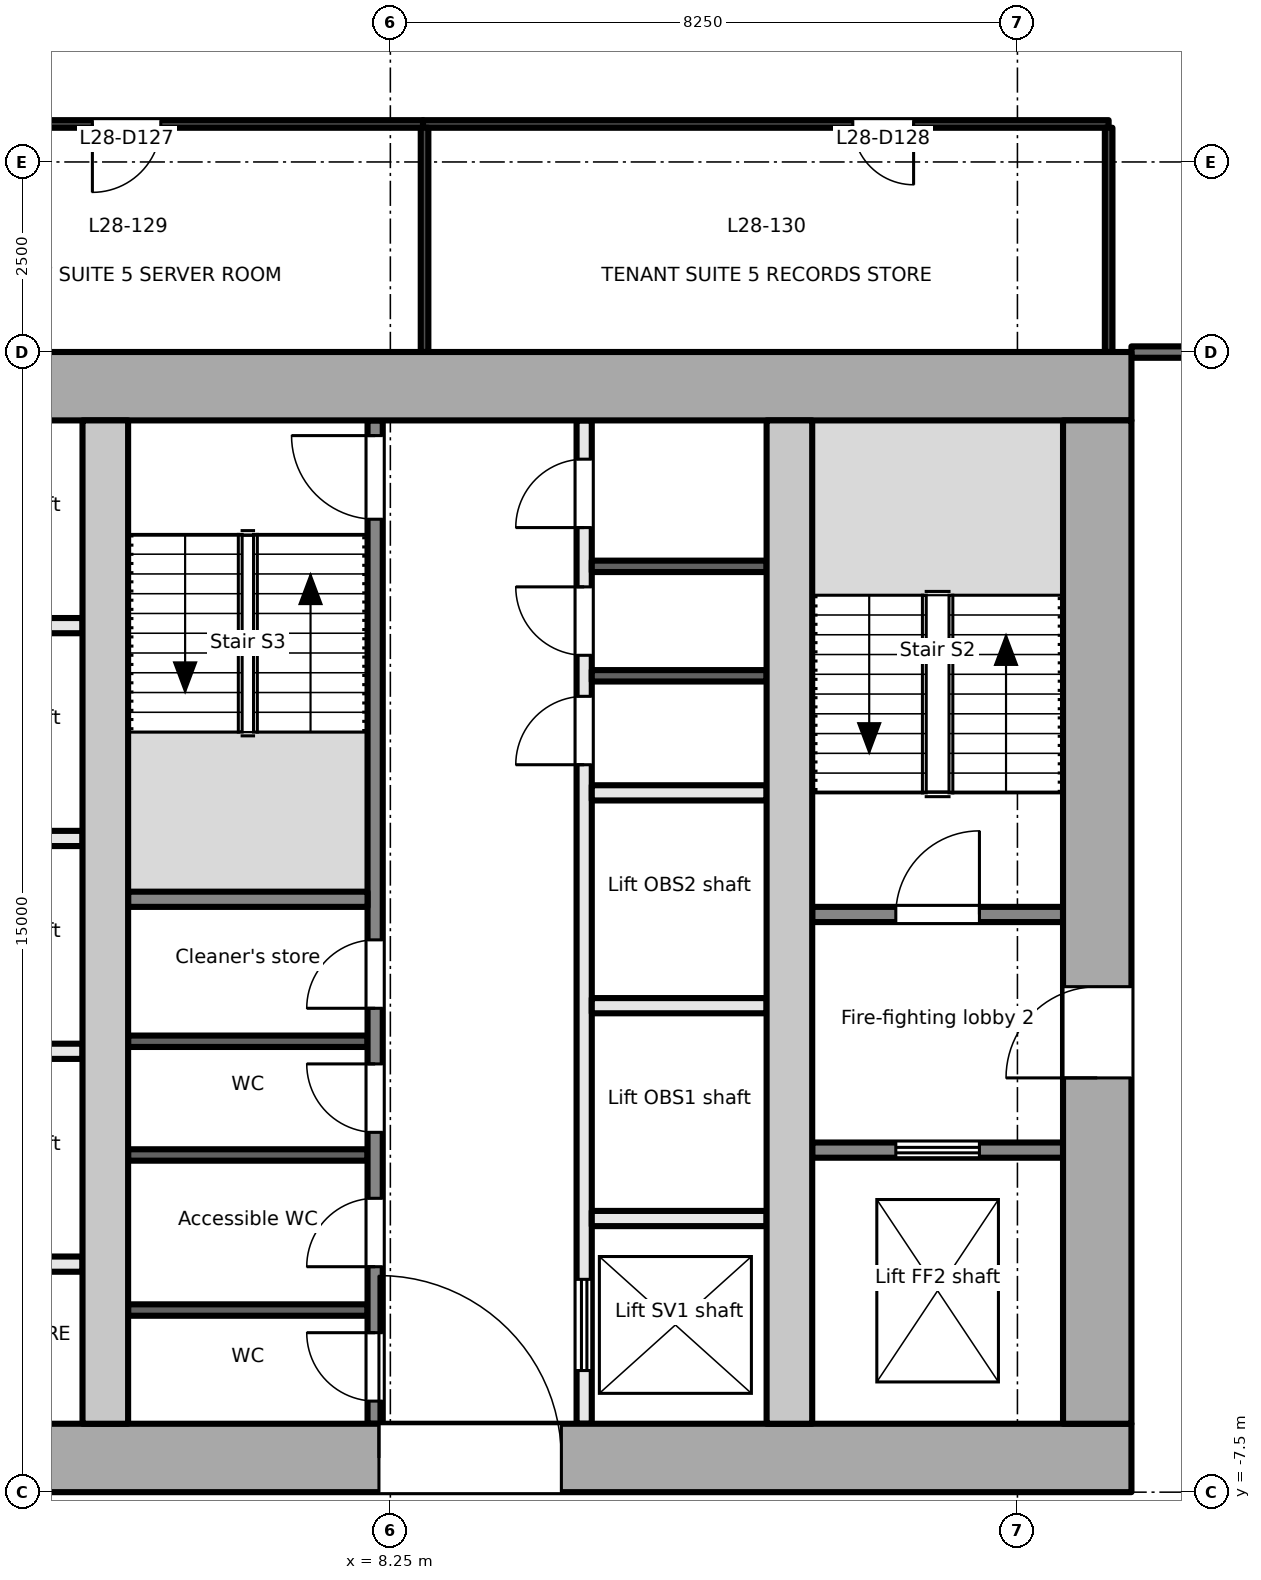
"""IFC4 building model, lengths in metres.
Left out: names, types, materials, properties, quantities, classifications, styles, units other than length and angle.
Written with IfcOpenShell. Run it as: python <this file> out.ifc"""

import sys

from ifc_helpers import new_model, si_unit, direction, frame, frame_2d, origin, place, context, subcontext, project, spatial, rectangle, extrude, element, fill, save


model = new_model("IFC4")
c1 = context("Model", 3, precision=1e-05, world=origin(), true_north=direction((0.0, 1.0)))
c2 = subcontext(c1, "Body", "Model", "MODEL_VIEW")
j1 = project(units=[si_unit("LENGTHUNIT", "METRE"), si_unit("PLANEANGLEUNIT", "RADIAN")], contexts=[c1])
p1 = place(None, origin())
s1 = spatial("IfcSite", under=j1, at=p1, CompositionType="ELEMENT")
p2 = place(p1, origin())
s2 = spatial("IfcBuilding", under=s1, at=p2, CompositionType="ELEMENT")
p3 = place(p2, frame((0.0, 0.0, 126.1)))
s3 = spatial("IfcBuildingStorey", under=s2, at=p3, CompositionType="ELEMENT", Elevation=126.1)
p4 = place(p3, frame((-18.0, -7.05, -0.2), z_axis=(0.0, 0.0, 1.0), x_axis=(1.0, 0.0, 0.0)))
e1 = element("IfcWall", 1, at=p4, inside=s3, PredefinedType="SHEAR", context=c2, shape_type="SweptSolid", body=[
    extrude(rectangle(XDim=36.0, YDim=0.9, at=frame_2d((18.0, 0.0))), origin(), (0.0, 0.0, 1.0), 4.0),
])
p5 = place(p4, frame((7.8, 0.0, 0.2)))
e2 = element("IfcOpeningElement", 2, at=p5, cuts=e1, PredefinedType="OPENING", context=c2, shape_type="SweptSolid", body=[
    extrude(rectangle(XDim=2.4, YDim=2.1, at=frame_2d((1.2, 1.05))), frame((0.0, 0.46, 0.0), z_axis=(0.0, -1.0, 0.0), x_axis=(1.0, 0.0, 0.0)), (0.0, 0.0, 1.0), 0.921),
])
p6 = place(p4, frame((17.4, 0.0, 0.2)))
e3 = element("IfcOpeningElement", 3, at=p6, cuts=e1, PredefinedType="OPENING", context=c2, shape_type="SweptSolid", body=[
    extrude(rectangle(XDim=1.2, YDim=2.1, at=frame_2d((0.6, 1.05))), frame((0.0, 0.46, 0.0), z_axis=(0.0, -1.0, 0.0), x_axis=(1.0, 0.0, 0.0)), (0.0, 0.0, 1.0), 0.921),
])
p7 = place(p4, frame((26.1, 0.0, 0.2)))
e4 = element("IfcOpeningElement", 4, at=p7, cuts=e1, PredefinedType="OPENING", context=c2, shape_type="SweptSolid", body=[
    extrude(rectangle(XDim=2.4, YDim=2.1, at=frame_2d((1.2, 1.05))), frame((0.0, 0.46, 0.0), z_axis=(0.0, -1.0, 0.0), x_axis=(1.0, 0.0, 0.0)), (0.0, 0.0, 1.0), 0.921),
])
p8 = place(p3, frame((-18.0, 7.05, -0.2), z_axis=(0.0, 0.0, 1.0), x_axis=(1.0, 0.0, 0.0)))
e5 = element("IfcWall", 5, at=p8, inside=s3, PredefinedType="SHEAR", context=c2, shape_type="SweptSolid", body=[
    extrude(rectangle(XDim=36.0, YDim=0.9, at=frame_2d((18.0, 0.0))), origin(), (0.0, 0.0, 1.0), 4.0),
])
p9 = place(p3, frame((17.55, -6.6, -0.2), z_axis=(0.0, 0.0, 1.0), x_axis=(0.0, 1.0, 0.0)))
e6 = element("IfcWall", 6, at=p9, inside=s3, PredefinedType="SHEAR", context=c2, shape_type="SweptSolid", body=[
    extrude(rectangle(XDim=13.2, YDim=0.9, at=frame_2d((6.6, 0.0))), origin(), (0.0, 0.0, 1.0), 4.0),
])
p10 = place(p9, frame((4.55, 0.0, 0.2)))
e7 = element("IfcOpeningElement", 7, at=p10, cuts=e6, PredefinedType="OPENING", context=c2, shape_type="SweptSolid", body=[
    extrude(rectangle(XDim=1.2, YDim=2.1, at=frame_2d((0.6, 1.05))), frame((0.0, 0.46, 0.0), z_axis=(0.0, -1.0, 0.0), x_axis=(1.0, 0.0, 0.0)), (0.0, 0.0, 1.0), 0.921),
])
for number, where, z_axis, x_axis in (
    (8, (4.5, -6.6, -0.2), (0.0, 0.0, 1.0), (0.0, 1.0, 0.0)),
    (9, (13.5, -6.6, -0.2), (0.0, 0.0, 1.0), (0.0, 1.0, 0.0)),
):
    element("IfcWall", number, at=place(p3, frame(where, z_axis=z_axis, x_axis=x_axis)), inside=s3, PredefinedType="SHEAR", context=c2, shape_type="SweptSolid", body=[
        extrude(rectangle(XDim=13.2, YDim=0.6, at=frame_2d((6.6, 0.0))), origin(), (0.0, 0.0, 1.0), 4.0),
    ])
p11 = place(p3, frame((13.8, -3.0, 0.0), z_axis=(0.0, 0.0, 1.0), x_axis=(1.0, 0.0, 0.0)))
e10 = element("IfcWall", 10, at=p11, inside=s3, PredefinedType="PARTITIONING", context=c2, shape_type="SweptSolid", body=[
    extrude(rectangle(XDim=3.3, YDim=0.2, at=frame_2d((1.65, 0.0))), origin(), (0.0, 0.0, 1.0), 3.8),
])
p12 = place(p11, frame((1.1, 0.0, 0.0)))
e11 = element("IfcOpeningElement", 11, at=p12, cuts=e10, PredefinedType="OPENING", context=c2, shape_type="SweptSolid", body=[
    extrude(rectangle(XDim=1.1, YDim=2.1, at=frame_2d((0.55, 1.05))), frame((0.0, 0.111, 0.0), z_axis=(0.0, -1.0, 0.0), x_axis=(1.0, 0.0, 0.0)), (0.0, 0.0, 1.0), 0.221),
])
p13 = place(p3, frame((13.8, 0.1, 0.0), z_axis=(0.0, 0.0, 1.0), x_axis=(1.0, 0.0, 0.0)))
e12 = element("IfcWall", 12, at=p13, inside=s3, PredefinedType="PARTITIONING", context=c2, shape_type="SweptSolid", body=[
    extrude(rectangle(XDim=3.3, YDim=0.2, at=frame_2d((1.65, 0.0))), origin(), (0.0, 0.0, 1.0), 3.8),
])
p14 = place(p13, frame((1.1, 0.0, 0.0)))
e13 = element("IfcOpeningElement", 13, at=p14, cuts=e12, PredefinedType="OPENING", context=c2, shape_type="SweptSolid", body=[
    extrude(rectangle(XDim=1.1, YDim=2.1, at=frame_2d((0.55, 1.05))), frame((0.0, 0.111, 0.0), z_axis=(0.0, -1.0, 0.0), x_axis=(1.0, 0.0, 0.0)), (0.0, 0.0, 1.0), 0.221),
])
for number, where, z_axis, x_axis in (
    (14, (1.9, -1.7, 0.0), (0.0, 0.0, 1.0), (1.0, 0.0, 0.0)),
    (15, (1.9, 1.1, 0.0), (0.0, 0.0, 1.0), (1.0, 0.0, 0.0)),
    (16, (1.9, 3.9, 0.0), (0.0, 0.0, 1.0), (1.0, 0.0, 0.0)),
    (17, (1.9, -4.5, 0.0), (0.0, 0.0, 1.0), (1.0, 0.0, 0.0)),
):
    element("IfcWall", number, at=place(p3, frame(where, z_axis=z_axis, x_axis=x_axis)), inside=s3, PredefinedType="PARTITIONING", context=c2, shape_type="SweptSolid", body=[
        extrude(rectangle(XDim=2.3, YDim=0.2, at=frame_2d((1.15, 0.0))), origin(), (0.0, 0.0, 1.0), 3.8),
    ])
p15 = place(p3, frame((8.05, -6.6, 0.0), z_axis=(0.0, 0.0, 1.0), x_axis=(0.0, 1.0, 0.0)))
e18 = element("IfcWall", 18, at=p15, inside=s3, PredefinedType="PARTITIONING", context=c2, shape_type="SweptSolid", body=[
    extrude(rectangle(XDim=13.2, YDim=0.2, at=frame_2d((6.6, 0.0))), origin(), (0.0, 0.0, 1.0), 3.8),
])
p16 = place(p15, frame((0.298, 0.0, 0.0)))
e19 = element("IfcOpeningElement", 19, at=p16, cuts=e18, PredefinedType="OPENING", context=c2, shape_type="SweptSolid", body=[
    extrude(rectangle(XDim=0.9, YDim=2.1, at=frame_2d((0.45, 1.05))), frame((0.0, 0.111, 0.0), z_axis=(0.0, -1.0, 0.0), x_axis=(1.0, 0.0, 0.0)), (0.0, 0.0, 1.0), 0.221),
])
p17 = place(p15, frame((2.066, 0.0, 0.0)))
e20 = element("IfcOpeningElement", 20, at=p17, cuts=e18, PredefinedType="OPENING", context=c2, shape_type="SweptSolid", body=[
    extrude(rectangle(XDim=0.9, YDim=2.1, at=frame_2d((0.45, 1.05))), frame((0.0, 0.111, 0.0), z_axis=(0.0, -1.0, 0.0), x_axis=(1.0, 0.0, 0.0)), (0.0, 0.0, 1.0), 0.221),
])
p18 = place(p15, frame((3.834, 0.0, 0.0)))
e21 = element("IfcOpeningElement", 21, at=p18, cuts=e18, PredefinedType="OPENING", context=c2, shape_type="SweptSolid", body=[
    extrude(rectangle(XDim=0.9, YDim=2.1, at=frame_2d((0.45, 1.05))), frame((0.0, 0.111, 0.0), z_axis=(0.0, -1.0, 0.0), x_axis=(1.0, 0.0, 0.0)), (0.0, 0.0, 1.0), 0.221),
])
p19 = place(p15, frame((5.466, 0.0, 0.0)))
e22 = element("IfcOpeningElement", 22, at=p19, cuts=e18, PredefinedType="OPENING", context=c2, shape_type="SweptSolid", body=[
    extrude(rectangle(XDim=0.9, YDim=2.1, at=frame_2d((0.45, 1.05))), frame((0.0, 0.111, 0.0), z_axis=(0.0, -1.0, 0.0), x_axis=(1.0, 0.0, 0.0)), (0.0, 0.0, 1.0), 0.221),
])
p20 = place(p15, frame((11.9, 0.0, 0.0)))
e23 = element("IfcOpeningElement", 23, at=p20, cuts=e18, PredefinedType="OPENING", context=c2, shape_type="SweptSolid", body=[
    extrude(rectangle(XDim=1.1, YDim=2.1, at=frame_2d((0.55, 1.05))), frame((0.0, 0.111, 0.0), z_axis=(0.0, -1.0, 0.0), x_axis=(1.0, 0.0, 0.0)), (0.0, 0.0, 1.0), 0.221),
])
p21 = place(p3, frame((10.8, -6.6, 0.0), z_axis=(0.0, 0.0, 1.0), x_axis=(0.0, 1.0, 0.0)))
e24 = element("IfcWall", 24, at=p21, inside=s3, PredefinedType="PARTITIONING", context=c2, shape_type="SweptSolid", body=[
    extrude(rectangle(XDim=13.2, YDim=0.2, at=frame_2d((6.6, 0.0))), origin(), (0.0, 0.0, 1.0), 3.8),
])
p22 = place(p21, frame((0.7, 0.0, 0.0)))
e25 = element("IfcOpeningElement", 25, at=p22, cuts=e24, PredefinedType="OPENING", context=c2, shape_type="SweptSolid", body=[
    extrude(rectangle(XDim=1.2, YDim=2.1, at=frame_2d((0.6, 1.05))), frame((0.0, 0.111, 0.0), z_axis=(0.0, -1.0, 0.0), x_axis=(1.0, 0.0, 0.0)), (0.0, 0.0, 1.0), 0.221),
])
p23 = place(p21, frame((8.67, 0.0, 0.0)))
e26 = element("IfcOpeningElement", 26, at=p23, cuts=e24, PredefinedType="OPENING", context=c2, shape_type="SweptSolid", body=[
    extrude(rectangle(XDim=0.9, YDim=2.1, at=frame_2d((0.45, 1.05))), frame((0.0, 0.111, 0.0), z_axis=(0.0, -1.0, 0.0), x_axis=(1.0, 0.0, 0.0)), (0.0, 0.0, 1.0), 0.221),
])
p24 = place(p21, frame((10.11, 0.0, 0.0)))
e27 = element("IfcOpeningElement", 27, at=p24, cuts=e24, PredefinedType="OPENING", context=c2, shape_type="SweptSolid", body=[
    extrude(rectangle(XDim=0.9, YDim=2.1, at=frame_2d((0.45, 1.05))), frame((0.0, 0.111, 0.0), z_axis=(0.0, -1.0, 0.0), x_axis=(1.0, 0.0, 0.0)), (0.0, 0.0, 1.0), 0.221),
])
p25 = place(p21, frame((11.79, 0.0, 0.0)))
e28 = element("IfcOpeningElement", 28, at=p25, cuts=e24, PredefinedType="OPENING", context=c2, shape_type="SweptSolid", body=[
    extrude(rectangle(XDim=0.9, YDim=2.1, at=frame_2d((0.45, 1.05))), frame((0.0, 0.111, 0.0), z_axis=(0.0, -1.0, 0.0), x_axis=(1.0, 0.0, 0.0)), (0.0, 0.0, 1.0), 0.221),
])
p26 = place(p3, frame((4.8, 0.3, 0.0), z_axis=(0.0, 0.0, 1.0), x_axis=(1.0, 0.0, 0.0)))
e29 = element("IfcWall", 29, at=p26, inside=s3, PredefinedType="PARTITIONING", context=c2, shape_type="SweptSolid", body=[
    extrude(rectangle(XDim=3.15, YDim=0.2, at=frame_2d((1.575, 0.0))), origin(), (0.0, 0.0, 1.0), 3.8),
])
for number, where, z_axis, x_axis in (
    (30, (4.8, -5.104, 0.0), (0.0, 0.0, 1.0), (1.0, 0.0, 0.0)),
    (31, (4.8, -3.064, 0.0), (0.0, 0.0, 1.0), (1.0, 0.0, 0.0)),
    (32, (4.8, -1.568, 0.0), (0.0, 0.0, 1.0), (1.0, 0.0, 0.0)),
):
    element("IfcWall", number, at=place(p3, frame(where, z_axis=z_axis, x_axis=x_axis)), inside=s3, PredefinedType="PARTITIONING", context=c2, shape_type="SweptSolid", body=[
        extrude(rectangle(XDim=3.15, YDim=0.15, at=frame_2d((1.575, 0.0))), origin(), (0.0, 0.0, 1.0), 3.8),
    ])
for number, where, z_axis, x_axis in (
    (33, (10.9, -3.9, 0.0), (0.0, 0.0, 1.0), (1.0, 0.0, 0.0)),
    (34, (10.9, -1.1, 0.0), (0.0, 0.0, 1.0), (1.0, 0.0, 0.0)),
    (35, (10.9, 1.7, 0.0), (0.0, 0.0, 1.0), (1.0, 0.0, 0.0)),
):
    element("IfcWall", number, at=place(p3, frame(where, z_axis=z_axis, x_axis=x_axis)), inside=s3, PredefinedType="PARTITIONING", context=c2, shape_type="SweptSolid", body=[
        extrude(rectangle(XDim=2.3, YDim=0.2, at=frame_2d((1.15, 0.0))), origin(), (0.0, 0.0, 1.0), 3.8),
    ])
for number, where, z_axis, x_axis in (
    (36, (10.9, 3.24, 0.0), (0.0, 0.0, 1.0), (1.0, 0.0, 0.0)),
    (37, (10.9, 4.68, 0.0), (0.0, 0.0, 1.0), (1.0, 0.0, 0.0)),
):
    element("IfcWall", number, at=place(p3, frame(where, z_axis=z_axis, x_axis=x_axis)), inside=s3, PredefinedType="PARTITIONING", context=c2, shape_type="SweptSolid", body=[
        extrude(rectangle(XDim=2.3, YDim=0.15, at=frame_2d((1.15, 0.0))), origin(), (0.0, 0.0, 1.0), 3.8),
    ])
p27 = place(p3, frame((18.0, 7.499, 0.0), z_axis=(0.0, 0.0, 1.0), x_axis=(1.0, 0.0, 0.0)))
e38 = element("IfcWall", 38, at=p27, inside=s3, PredefinedType="PARTITIONING", context=c2, shape_type="SweptSolid", body=[
    extrude(rectangle(XDim=2.61, YDim=0.15, at=frame_2d((1.305, 0.0))), origin(), (0.0, 0.0, 1.0), 3.8),
])
p28 = place(p3, frame((8.68, 10.5, 0.0), z_axis=(0.0, 0.0, 1.0), x_axis=(-1.0, 0.0, 0.0)))
e39 = element("IfcWall", 39, at=p28, inside=s3, PredefinedType="PARTITIONING", context=c2, shape_type="SweptSolid", body=[
    extrude(rectangle(XDim=7.8, YDim=0.1, at=frame_2d((3.9, 0.0))), origin(), (0.0, 0.0, 1.0), 3.5),
])
p29 = place(p28, frame((3.45, 0.0, 0.0)))
e40 = element("IfcOpeningElement", 40, at=p29, cuts=e39, PredefinedType="OPENING", context=c2, shape_type="SweptSolid", body=[
    extrude(rectangle(XDim=0.9, YDim=2.1, at=frame_2d((0.45, 1.05))), frame((0.0, 0.061, 0.0), z_axis=(0.0, -1.0, 0.0), x_axis=(1.0, 0.0, 0.0)), (0.0, 0.0, 1.0), 0.121),
])
p30 = place(p3, frame((17.7, 10.5, 0.0), z_axis=(0.0, 0.0, 1.0), x_axis=(-1.0, 0.0, 0.0)))
e41 = element("IfcWall", 41, at=p30, inside=s3, PredefinedType="PARTITIONING", context=c2, shape_type="SweptSolid", body=[
    extrude(rectangle(XDim=9.02, YDim=0.1, at=frame_2d((4.51, 0.0))), origin(), (0.0, 0.0, 1.0), 3.5),
])
p31 = place(p30, frame((2.566, 0.0, 0.0)))
e42 = element("IfcOpeningElement", 42, at=p31, cuts=e41, PredefinedType="OPENING", context=c2, shape_type="SweptSolid", body=[
    extrude(rectangle(XDim=0.8, YDim=2.1, at=frame_2d((0.4, 1.05))), frame((0.0, 0.061, 0.0), z_axis=(0.0, -1.0, 0.0), x_axis=(1.0, 0.0, 0.0)), (0.0, 0.0, 1.0), 0.121),
])
for number, where, z_axis, x_axis in (
    (43, (17.7, 7.5, 0.0), (0.0, 0.0, 1.0), (0.0, 1.0, 0.0)),
    (44, (8.7, 10.45, 0.0), (0.0, 0.0, 1.0), (0.0, -1.0, 0.0)),
):
    element("IfcWall", number, at=place(p3, frame(where, z_axis=z_axis, x_axis=x_axis)), inside=s3, PredefinedType="PARTITIONING", context=c2, shape_type="SweptSolid", body=[
        extrude(rectangle(XDim=2.95, YDim=0.1, at=frame_2d((1.475, 0.0))), origin(), (0.0, 0.0, 1.0), 3.8),
    ])
p32 = place(p12, origin())
e45 = element("IfcDoor", 45, at=p32, inside=s3, OperationType="DOUBLE_DOOR_SLIDING", PredefinedType="DOOR", context=c2, shape_type="SweptSolid", body=[
    extrude(rectangle(XDim=1.1, YDim=2.1, at=frame_2d((0.55, 1.05))), frame((0.0, 0.025, 0.0), z_axis=(0.0, -1.0, 0.0), x_axis=(1.0, 0.0, 0.0)), (0.0, 0.0, 1.0), 0.05),
])
fill(e11, e45)
p33 = place(p10, origin())
e46 = element("IfcDoor", 46, at=p33, inside=s3, OperationType="SINGLE_SWING_LEFT", PredefinedType="DOOR", context=c2, shape_type="SweptSolid", body=[
    extrude(rectangle(XDim=1.2, YDim=2.1, at=frame_2d((0.6, 1.05))), frame((0.0, 0.025, 0.0), z_axis=(0.0, -1.0, 0.0), x_axis=(1.0, 0.0, 0.0)), (0.0, 0.0, 1.0), 0.05),
])
fill(e7, e46)
p34 = place(p14, origin())
e47 = element("IfcDoor", 47, at=p34, inside=s3, OperationType="SINGLE_SWING_RIGHT", PredefinedType="DOOR", context=c2, shape_type="SweptSolid", body=[
    extrude(rectangle(XDim=1.1, YDim=2.1, at=frame_2d((0.55, 1.05))), frame((0.0, 0.025, 0.0), z_axis=(0.0, -1.0, 0.0), x_axis=(1.0, 0.0, 0.0)), (0.0, 0.0, 1.0), 0.05),
])
fill(e13, e47)
p35 = place(p16, origin())
e48 = element("IfcDoor", 48, at=p35, inside=s3, OperationType="SINGLE_SWING_RIGHT", PredefinedType="DOOR", context=c2, shape_type="SweptSolid", body=[
    extrude(rectangle(XDim=0.9, YDim=2.1, at=frame_2d((0.45, 1.05))), frame((0.0, 0.025, 0.0), z_axis=(0.0, -1.0, 0.0), x_axis=(1.0, 0.0, 0.0)), (0.0, 0.0, 1.0), 0.05),
])
fill(e19, e48)
p36 = place(p17, origin())
e49 = element("IfcDoor", 49, at=p36, inside=s3, OperationType="SINGLE_SWING_LEFT", PredefinedType="DOOR", context=c2, shape_type="SweptSolid", body=[
    extrude(rectangle(XDim=0.9, YDim=2.1, at=frame_2d((0.45, 1.05))), frame((0.0, 0.025, 0.0), z_axis=(0.0, -1.0, 0.0), x_axis=(1.0, 0.0, 0.0)), (0.0, 0.0, 1.0), 0.05),
])
fill(e20, e49)
p37 = place(p18, origin())
e50 = element("IfcDoor", 50, at=p37, inside=s3, OperationType="SINGLE_SWING_RIGHT", PredefinedType="DOOR", context=c2, shape_type="SweptSolid", body=[
    extrude(rectangle(XDim=0.9, YDim=2.1, at=frame_2d((0.45, 1.05))), frame((0.0, 0.025, 0.0), z_axis=(0.0, -1.0, 0.0), x_axis=(1.0, 0.0, 0.0)), (0.0, 0.0, 1.0), 0.05),
])
fill(e21, e50)
p38 = place(p19, origin())
e51 = element("IfcDoor", 51, at=p38, inside=s3, OperationType="SINGLE_SWING_LEFT", PredefinedType="DOOR", context=c2, shape_type="SweptSolid", body=[
    extrude(rectangle(XDim=0.9, YDim=2.1, at=frame_2d((0.45, 1.05))), frame((0.0, 0.025, 0.0), z_axis=(0.0, -1.0, 0.0), x_axis=(1.0, 0.0, 0.0)), (0.0, 0.0, 1.0), 0.05),
])
fill(e22, e51)
p39 = place(p20, origin())
e52 = element("IfcDoor", 52, at=p39, inside=s3, OperationType="SINGLE_SWING_RIGHT", PredefinedType="DOOR", context=c2, shape_type="SweptSolid", body=[
    extrude(rectangle(XDim=1.1, YDim=2.1, at=frame_2d((0.55, 1.05))), frame((0.0, 0.025, 0.0), z_axis=(0.0, -1.0, 0.0), x_axis=(1.0, 0.0, 0.0)), (0.0, 0.0, 1.0), 0.05),
])
fill(e23, e52)
p40 = place(p7, origin())
e53 = element("IfcDoor", 53, at=p40, inside=s3, OperationType="DOUBLE_DOOR_DOUBLE_SWING", PredefinedType="DOOR", context=c2, shape_type="SweptSolid", body=[
    extrude(rectangle(XDim=2.4, YDim=2.1, at=frame_2d((1.2, 1.05))), frame((0.0, 0.025, 0.0), z_axis=(0.0, -1.0, 0.0), x_axis=(1.0, 0.0, 0.0)), (0.0, 0.0, 1.0), 0.05),
])
fill(e4, e53)
p41 = place(p22, origin())
e54 = element("IfcDoor", 54, at=p41, inside=s3, OperationType="DOUBLE_DOOR_SLIDING", PredefinedType="DOOR", context=c2, shape_type="SweptSolid", body=[
    extrude(rectangle(XDim=1.2, YDim=2.1, at=frame_2d((0.6, 1.05))), frame((0.0, 0.025, 0.0), z_axis=(0.0, -1.0, 0.0), x_axis=(1.0, 0.0, 0.0)), (0.0, 0.0, 1.0), 0.05),
])
fill(e25, e54)
p42 = place(p23, origin())
e55 = element("IfcDoor", 55, at=p42, inside=s3, OperationType="SINGLE_SWING_LEFT", PredefinedType="DOOR", context=c2, shape_type="SweptSolid", body=[
    extrude(rectangle(XDim=0.9, YDim=2.1, at=frame_2d((0.45, 1.05))), frame((0.0, 0.025, 0.0), z_axis=(0.0, -1.0, 0.0), x_axis=(1.0, 0.0, 0.0)), (0.0, 0.0, 1.0), 0.05),
])
fill(e26, e55)
p43 = place(p24, origin())
e56 = element("IfcDoor", 56, at=p43, inside=s3, OperationType="SINGLE_SWING_RIGHT", PredefinedType="DOOR", context=c2, shape_type="SweptSolid", body=[
    extrude(rectangle(XDim=0.9, YDim=2.1, at=frame_2d((0.45, 1.05))), frame((0.0, 0.025, 0.0), z_axis=(0.0, -1.0, 0.0), x_axis=(1.0, 0.0, 0.0)), (0.0, 0.0, 1.0), 0.05),
])
fill(e27, e56)
p44 = place(p25, origin())
e57 = element("IfcDoor", 57, at=p44, inside=s3, OperationType="SINGLE_SWING_LEFT", PredefinedType="DOOR", context=c2, shape_type="SweptSolid", body=[
    extrude(rectangle(XDim=0.9, YDim=2.1, at=frame_2d((0.45, 1.05))), frame((0.0, 0.025, 0.0), z_axis=(0.0, -1.0, 0.0), x_axis=(1.0, 0.0, 0.0)), (0.0, 0.0, 1.0), 0.05),
])
fill(e28, e57)
p45 = place(p29, origin())
e58 = element("IfcDoor", 58, at=p45, inside=s3, OperationType="SINGLE_SWING_RIGHT", PredefinedType="DOOR", context=c2, shape_type="SweptSolid", body=[
    extrude(rectangle(XDim=0.9, YDim=2.1, at=frame_2d((0.45, 1.05))), frame((0.0, 0.025, 0.0), z_axis=(0.0, -1.0, 0.0), x_axis=(1.0, 0.0, 0.0)), (0.0, 0.0, 1.0), 0.05),
])
fill(e40, e58)
p46 = place(p31, origin())
e59 = element("IfcDoor", 59, at=p46, inside=s3, OperationType="SINGLE_SWING_LEFT", PredefinedType="DOOR", context=c2, shape_type="SweptSolid", body=[
    extrude(rectangle(XDim=0.8, YDim=2.1, at=frame_2d((0.4, 1.05))), frame((0.0, 0.025, 0.0), z_axis=(0.0, -1.0, 0.0), x_axis=(1.0, 0.0, 0.0)), (0.0, 0.0, 1.0), 0.05),
])
fill(e42, e59)
save(model, sys.argv[1])
